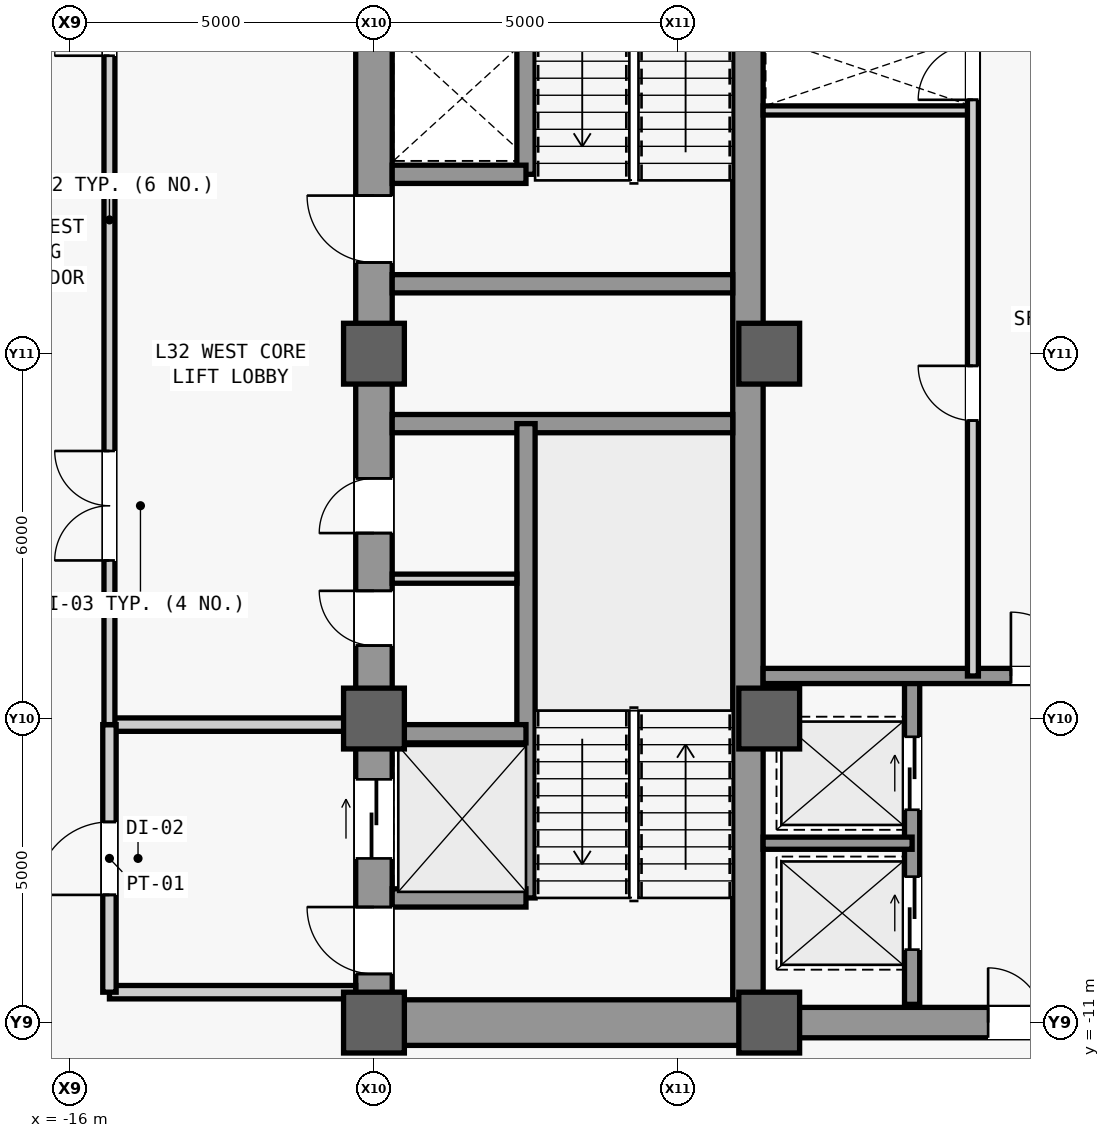
"""IFC4 building model, lengths in metres.
Left out: names, types, materials, properties, quantities, classifications, styles, units other than length and angle.
Written with IfcOpenShell. Run it as: python <this file> out.ifc"""

import sys

from ifc_helpers import new_model, si_unit, direction, frame, frame_2d, origin, origin_2d, place, context, subcontext, project, spatial, rectangle, extrude, source, transform, mapped, element, fill, save


model = new_model("IFC4")
c1 = context("Model", 3, precision=1e-05, world=origin(), true_north=direction((0.0, 1.0)))
c2 = subcontext(c1, "Body", "Model", "MODEL_VIEW")
j1 = project(units=[si_unit("LENGTHUNIT", "METRE"), si_unit("PLANEANGLEUNIT", "RADIAN")], contexts=[c1])
p1 = place(None, origin())
s1 = spatial("IfcSite", under=j1, at=p1, CompositionType="ELEMENT")
p2 = place(p1, origin())
s2 = spatial("IfcBuilding", under=s1, at=p2, CompositionType="ELEMENT")
p3 = place(p2, frame((0.0, 0.0, 140.6)))
s3 = spatial("IfcBuildingStorey", under=s2, at=p3, CompositionType="ELEMENT", Elevation=140.6)
m1 = source(origin(), c2, "Body", "SweptSolid", [
    extrude(rectangle(XDim=22.0, YDim=0.6, at=frame_2d((11.0, 0.0))), origin(), (0.0, 0.0, 1.0), 3.84),
])
p4 = place(p3, frame((-11.0, -11.0, 0.0), z_axis=(0.0, 0.0, 1.0), x_axis=(0.0, 1.0, 0.0)))
e1 = element("IfcWall", 1, at=p4, inside=s3, PredefinedType="SHEAR", context=c2, shape_type="MappedRepresentation", body=[
    mapped(m1, transform((0.0, 0.0, 0.0), scale=1.0)),
])
m2 = source(origin(), c2, "Body", "SweptSolid", [
    extrude(rectangle(XDim=1.1, YDim=2.2, at=frame_2d((0.55, 1.1))), frame((0.0, 0.31, 0.0), z_axis=(0.0, -1.0, 0.0), x_axis=(1.0, 0.0, 0.0)), (0.0, 0.0, 1.0), 0.62),
])
p5 = place(p4, frame((0.8, 0.0, 0.0)))
e2 = element("IfcOpeningElement", 2, at=p5, cuts=e1, PredefinedType="OPENING", context=c2, shape_type="MappedRepresentation", body=[
    mapped(m2, transform((0.0, 0.0, 0.0), scale=1.0)),
])
p6 = place(p4, frame((12.5, 0.0, 0.0)))
e3 = element("IfcOpeningElement", 3, at=p6, cuts=e1, PredefinedType="OPENING", context=c2, shape_type="MappedRepresentation", body=[
    mapped(m2, transform((0.0, 0.0, 0.0), scale=1.0)),
])
m3 = source(origin(), c2, "Body", "SweptSolid", [
    extrude(rectangle(XDim=0.9, YDim=2.15, at=frame_2d((0.45, 1.075))), frame((0.0, 0.31, 0.0), z_axis=(0.0, -1.0, 0.0), x_axis=(1.0, 0.0, 0.0)), (0.0, 0.0, 1.0), 0.62),
])
p7 = place(p4, frame((6.2, 0.0, 0.0)))
e4 = element("IfcOpeningElement", 4, at=p7, cuts=e1, PredefinedType="OPENING", context=c2, shape_type="MappedRepresentation", body=[
    mapped(m3, transform((0.0, 0.0, 0.0), scale=1.0)),
])
p8 = place(p4, frame((8.05, 0.0, 0.0)))
e5 = element("IfcOpeningElement", 5, at=p8, cuts=e1, PredefinedType="OPENING", context=c2, shape_type="MappedRepresentation", body=[
    mapped(m3, transform((0.0, 0.0, 0.0), scale=1.0)),
])
m4 = source(origin(), c2, "Body", "SweptSolid", [
    extrude(rectangle(XDim=1.3, YDim=2.3, at=frame_2d((0.65, 1.15))), frame((0.0, 0.31, 0.0), z_axis=(0.0, -1.0, 0.0), x_axis=(1.0, 0.0, 0.0)), (0.0, 0.0, 1.0), 0.62),
])
p9 = place(p4, frame((2.7, 0.0, 0.0)))
e6 = element("IfcOpeningElement", 6, at=p9, cuts=e1, PredefinedType="OPENING", context=c2, shape_type="MappedRepresentation", body=[
    mapped(m4, transform((0.0, 0.0, 0.0), scale=1.0)),
])
m5 = source(origin(), c2, "Body", "SweptSolid", [
    extrude(rectangle(XDim=21.4, YDim=0.5, at=frame_2d((10.7, 0.0))), origin(), (0.0, 0.0, 1.0), 3.84),
])
p10 = place(p3, frame((-4.85, -10.7, 0.0), z_axis=(0.0, 0.0, 1.0), x_axis=(0.0, 1.0, 0.0)))
e7 = element("IfcWall", 7, at=p10, inside=s3, PredefinedType="SHEAR", context=c2, shape_type="MappedRepresentation", body=[
    mapped(m5, transform((0.0, 0.0, 0.0), scale=1.0)),
])
m6 = source(origin(), c2, "Body", "SweptSolid", [
    extrude(rectangle(XDim=5.85, YDim=0.75, at=frame_2d((2.925, 0.0))), origin(), (0.0, 0.0, 1.0), 3.84),
])
p11 = place(p3, frame((-10.7, -11.0, 0.0), z_axis=(0.0, 0.0, 1.0), x_axis=(1.0, 0.0, 0.0)))
e8 = element("IfcWall", 8, at=p11, inside=s3, PredefinedType="SHEAR", context=c2, shape_type="MappedRepresentation", body=[
    mapped(m6, transform((0.0, 0.0, 0.0), scale=1.0)),
])
m7 = source(origin(), c2, "Body", "SweptSolid", [
    extrude(rectangle(XDim=5.6, YDim=0.3, at=frame_2d((2.8, 0.0))), origin(), (0.0, 0.0, 1.0), 3.84),
])
for number, where, z_axis, x_axis in (
    (9, (-10.7, -1.15, 0.0), (0.0, 0.0, 1.0), (1.0, 0.0, 0.0)),
    (10, (-10.7, 1.15, 0.0), (0.0, 0.0, 1.0), (1.0, 0.0, 0.0)),
):
    element("IfcWall", number, at=place(p3, frame(where, z_axis=z_axis, x_axis=x_axis)), inside=s3, PredefinedType="SHEAR", context=c2, shape_type="MappedRepresentation", body=[
        mapped(m7, transform((0.0, 0.0, 0.0), scale=1.0)),
    ])
m8 = source(origin(), c2, "Body", "SweptSolid", [
    extrude(rectangle(XDim=9.2, YDim=0.5, at=frame_2d((4.6, 0.0))), origin(), (0.0, 0.0, 1.0), 3.84),
])
p12 = place(p3, frame((-4.6, -11.0, 0.0), z_axis=(0.0, 0.0, 1.0), x_axis=(1.0, 0.0, 0.0)))
e11 = element("IfcWall", 11, at=p12, inside=s3, PredefinedType="SHEAR", context=c2, shape_type="MappedRepresentation", body=[
    mapped(m8, transform((0.0, 0.0, 0.0), scale=1.0)),
])
m9 = source(origin(), c2, "Body", "SweptSolid", [
    extrude(rectangle(XDim=1.8, YDim=2.25, at=frame_2d((0.9, 1.125))), frame((0.0, 0.26, 0.0), z_axis=(0.0, -1.0, 0.0), x_axis=(1.0, 0.0, 0.0)), (0.0, 0.0, 1.0), 0.52),
])
p13 = place(p12, frame((3.7, 0.0, 0.0)))
e12 = element("IfcOpeningElement", 12, at=p13, cuts=e11, PredefinedType="OPENING", context=c2, shape_type="MappedRepresentation", body=[
    mapped(m9, transform((0.0, 0.0, 0.0), scale=1.0)),
])
m10 = source(origin(), c2, "Body", "SweptSolid", [
    extrude(rectangle(XDim=1.0, YDim=1.0, at=origin_2d()), origin(), (0.0, 0.0, 1.0), 4.1),
])
for number, where, z_axis, x_axis in (
    (13, (-11.0, -11.0, 0.0), (0.0, 0.0, 1.0), (1.0, 0.0, 0.0)),
    (14, (-11.0, -6.0, 0.0), (0.0, 0.0, 1.0), (1.0, 0.0, 0.0)),
    (15, (-11.0, 0.0, 0.0), (0.0, 0.0, 1.0), (1.0, 0.0, 0.0)),
    (16, (-4.5, -11.0, 0.0), (0.0, 0.0, 1.0), (1.0, 0.0, 0.0)),
    (17, (-4.5, -6.0, 0.0), (0.0, 0.0, 1.0), (1.0, 0.0, 0.0)),
    (18, (-4.5, 0.0, 0.0), (0.0, 0.0, 1.0), (1.0, 0.0, 0.0)),
):
    element("IfcColumn", number, at=place(p3, frame(where, z_axis=z_axis, x_axis=x_axis)), inside=s3, PredefinedType="COLUMN", context=c2, shape_type="MappedRepresentation", body=[
        mapped(m10, transform((0.0, 0.0, 0.0), scale=1.0)),
    ])
m11 = source(origin(), c2, "Body", "SweptSolid", [
    extrude(rectangle(XDim=7.8, YDim=0.3, at=frame_2d((3.9, 0.0))), origin(), (0.0, 0.0, 1.0), 3.84),
])
p14 = place(p3, frame((-8.5, -8.95, 0.0), z_axis=(0.0, 0.0, 1.0), x_axis=(0.0, 1.0, 0.0)))
e19 = element("IfcWall", 19, at=p14, inside=s3, PredefinedType="SHEAR", context=c2, shape_type="MappedRepresentation", body=[
    mapped(m11, transform((0.0, 0.0, 0.0), scale=1.0)),
])
m12 = source(origin(), c2, "Body", "SweptSolid", [
    extrude(rectangle(XDim=2.2, YDim=0.3, at=frame_2d((1.1, 0.0))), origin(), (0.0, 0.0, 1.0), 3.84),
])
for number, where, z_axis, x_axis in (
    (20, (-10.7, -8.95, 0.0), (0.0, 0.0, 1.0), (1.0, 0.0, 0.0)),
    (21, (-10.7, -6.25, 0.0), (0.0, 0.0, 1.0), (1.0, 0.0, 0.0)),
):
    element("IfcWall", number, at=place(p3, frame(where, z_axis=z_axis, x_axis=x_axis)), inside=s3, PredefinedType="SHEAR", context=c2, shape_type="MappedRepresentation", body=[
        mapped(m12, transform((0.0, 0.0, 0.0), scale=1.0)),
    ])
m13 = source(origin(), c2, "Body", "SweptSolid", [
    extrude(rectangle(XDim=7.75, YDim=0.3, at=frame_2d((3.875, 0.0))), origin(), (0.0, 0.0, 1.0), 3.84),
])
p15 = place(p3, frame((-8.5, 2.95, 0.0), z_axis=(0.0, 0.0, 1.0), x_axis=(0.0, 1.0, 0.0)))
e22 = element("IfcWall", 22, at=p15, inside=s3, PredefinedType="SHEAR", context=c2, shape_type="MappedRepresentation", body=[
    mapped(m13, transform((0.0, 0.0, 0.0), scale=1.0)),
])
p16 = place(p3, frame((-10.7, 2.95, 0.0), z_axis=(0.0, 0.0, 1.0), x_axis=(1.0, 0.0, 0.0)))
e23 = element("IfcWall", 23, at=p16, inside=s3, PredefinedType="SHEAR", context=c2, shape_type="MappedRepresentation", body=[
    mapped(m12, transform((0.0, 0.0, 0.0), scale=1.0)),
])
m14 = source(origin(), c2, "Body", "SweptSolid", [
    extrude(rectangle(XDim=2.05, YDim=0.15, at=frame_2d((1.025, 0.0))), origin(), (0.0, 0.0, 1.0), 3.84),
])
p17 = place(p3, frame((-10.7, -3.7, 0.0), z_axis=(0.0, 0.0, 1.0), x_axis=(1.0, 0.0, 0.0)))
e24 = element("IfcWall", 24, at=p17, inside=s3, PredefinedType="PARTITIONING", context=c2, shape_type="MappedRepresentation", body=[
    mapped(m14, transform((0.0, 0.0, 0.0), scale=1.0)),
])
m15 = source(origin(), c2, "Body", "SweptSolid", [
    extrude(rectangle(XDim=4.05, YDim=0.22, at=frame_2d((2.025, 0.0))), origin(), (0.0, 0.0, 1.0), 3.84),
])
p18 = place(p3, frame((-15.35, -10.5, 0.0), z_axis=(0.0, 0.0, 1.0), x_axis=(1.0, 0.0, 0.0)))
e25 = element("IfcWall", 25, at=p18, inside=s3, PredefinedType="PARTITIONING", context=c2, shape_type="MappedRepresentation", body=[
    mapped(m15, transform((0.0, 0.0, 0.0), scale=1.0)),
])
m16 = source(origin(), c2, "Body", "SweptSolid", [
    extrude(rectangle(XDim=4.05, YDim=0.22, at=frame_2d((2.025, 0.0))), origin(), (0.0, 0.0, 1.0), 3.067),
])
p19 = place(p3, frame((-15.35, -6.1, 0.0), z_axis=(0.0, 0.0, 1.0), x_axis=(1.0, 0.0, 0.0)))
e26 = element("IfcWall", 26, at=p19, inside=s3, PredefinedType="PARTITIONING", context=c2, shape_type="MappedRepresentation", body=[
    mapped(m16, transform((0.0, 0.0, 0.0), scale=1.0)),
])
m17 = source(origin(), c2, "Body", "SweptSolid", [
    extrude(rectangle(XDim=4.4, YDim=0.22, at=frame_2d((2.2, 0.0))), origin(), (0.0, 0.0, 1.0), 3.84),
])
p20 = place(p3, frame((-15.35, -10.5, 0.0), z_axis=(0.0, 0.0, 1.0), x_axis=(0.0, 1.0, 0.0)))
e27 = element("IfcWall", 27, at=p20, inside=s3, PredefinedType="PARTITIONING", context=c2, shape_type="MappedRepresentation", body=[
    mapped(m17, transform((0.0, 0.0, 0.0), scale=1.0)),
])
m18 = source(origin(), c2, "Body", "SweptSolid", [
    extrude(rectangle(XDim=1.2, YDim=2.2, at=frame_2d((0.6, 1.1))), frame((0.0, 0.12, 0.0), z_axis=(0.0, -1.0, 0.0), x_axis=(1.0, 0.0, 0.0)), (0.0, 0.0, 1.0), 0.24),
])
p21 = place(p20, frame((1.6, 0.0, 0.0)))
e28 = element("IfcOpeningElement", 28, at=p21, cuts=e27, PredefinedType="OPENING", context=c2, shape_type="MappedRepresentation", body=[
    mapped(m18, transform((0.0, 0.0, 0.0), scale=1.0)),
])
m19 = source(origin(), c2, "Body", "SweptSolid", [
    extrude(rectangle(XDim=16.6, YDim=0.18, at=frame_2d((8.3, 0.0))), origin(), (0.0, 0.0, 1.0), 3.84),
])
p22 = place(p3, frame((-15.35, -6.1, 0.0), z_axis=(0.0, 0.0, 1.0), x_axis=(0.0, 1.0, 0.0)))
e29 = element("IfcWall", 29, at=p22, inside=s3, PredefinedType="PARTITIONING", context=c2, shape_type="MappedRepresentation", body=[
    mapped(m19, transform((0.0, 0.0, 0.0), scale=1.0)),
])
m20 = source(origin(), c2, "Body", "SweptSolid", [
    extrude(rectangle(XDim=1.8, YDim=2.25, at=frame_2d((0.9, 1.125))), frame((0.0, 0.1, 0.0), z_axis=(0.0, -1.0, 0.0), x_axis=(1.0, 0.0, 0.0)), (0.0, 0.0, 1.0), 0.2),
])
p23 = place(p22, frame((2.7, 0.0, 0.0)))
e30 = element("IfcOpeningElement", 30, at=p23, cuts=e29, PredefinedType="OPENING", context=c2, shape_type="MappedRepresentation", body=[
    mapped(m20, transform((0.0, 0.0, 0.0), scale=1.0)),
])
p24 = place(p22, frame((11.0, 0.0, 0.0)))
e31 = element("IfcOpeningElement", 31, at=p24, cuts=e29, PredefinedType="OPENING", context=c2, shape_type="MappedRepresentation", body=[
    mapped(m20, transform((0.0, 0.0, 0.0), scale=1.0)),
])
m21 = source(origin(), c2, "Body", "SweptSolid", [
    extrude(rectangle(XDim=3.45, YDim=0.15, at=frame_2d((1.725, 0.0))), origin(), (0.0, 0.0, 1.0), 3.84),
])
p25 = place(p3, frame((-4.6, 4.0, 0.0), z_axis=(0.0, 0.0, 1.0), x_axis=(1.0, 0.0, 0.0)))
e32 = element("IfcWall", 32, at=p25, inside=s3, PredefinedType="PARTITIONING", context=c2, shape_type="MappedRepresentation", body=[
    mapped(m21, transform((0.0, 0.0, 0.0), scale=1.0)),
])
m22 = source(origin(), c2, "Body", "SweptSolid", [
    extrude(rectangle(XDim=5.4, YDim=0.25, at=frame_2d((2.7, 0.0))), origin(), (0.0, 0.0, 1.0), 3.84),
])
p26 = place(p3, frame((-2.15, -10.7, 0.0), z_axis=(0.0, 0.0, 1.0), x_axis=(0.0, 1.0, 0.0)))
e33 = element("IfcWall", 33, at=p26, inside=s3, PredefinedType="SHEAR", context=c2, shape_type="MappedRepresentation", body=[
    mapped(m22, transform((0.0, 0.0, 0.0), scale=1.0)),
])
m23 = source(origin(), c2, "Body", "SweptSolid", [
    extrude(rectangle(XDim=1.2, YDim=2.3, at=frame_2d((0.6, 1.15))), frame((0.0, 0.135, 0.0), z_axis=(0.0, -1.0, 0.0), x_axis=(1.0, 0.0, 0.0)), (0.0, 0.0, 1.0), 0.27),
])
p27 = place(p26, frame((0.9, 0.0, 0.0)))
e34 = element("IfcOpeningElement", 34, at=p27, cuts=e33, PredefinedType="OPENING", context=c2, shape_type="MappedRepresentation", body=[
    mapped(m23, transform((0.0, 0.0, 0.0), scale=1.0)),
])
p28 = place(p26, frame((3.2, 0.0, 0.0)))
e35 = element("IfcOpeningElement", 35, at=p28, cuts=e33, PredefinedType="OPENING", context=c2, shape_type="MappedRepresentation", body=[
    mapped(m23, transform((0.0, 0.0, 0.0), scale=1.0)),
])
m24 = source(origin(), c2, "Body", "SweptSolid", [
    extrude(rectangle(XDim=2.45, YDim=0.2, at=frame_2d((1.225, 0.0))), origin(), (0.0, 0.0, 1.0), 3.84),
])
p29 = place(p3, frame((-4.6, -8.05, 0.0), z_axis=(0.0, 0.0, 1.0), x_axis=(1.0, 0.0, 0.0)))
e36 = element("IfcWall", 36, at=p29, inside=s3, PredefinedType="SHEAR", context=c2, shape_type="MappedRepresentation", body=[
    mapped(m24, transform((0.0, 0.0, 0.0), scale=1.0)),
])
m25 = source(origin(), c2, "Body", "SweptSolid", [
    extrude(rectangle(XDim=9.2, YDim=0.25, at=frame_2d((4.6, 0.0))), origin(), (0.0, 0.0, 1.0), 3.84),
])
p30 = place(p3, frame((-4.6, -5.3, 0.0), z_axis=(0.0, 0.0, 1.0), x_axis=(1.0, 0.0, 0.0)))
e37 = element("IfcWall", 37, at=p30, inside=s3, PredefinedType="SHEAR", context=c2, shape_type="MappedRepresentation", body=[
    mapped(m25, transform((0.0, 0.0, 0.0), scale=1.0)),
])
m26 = source(origin(), c2, "Body", "SweptSolid", [
    extrude(rectangle(XDim=1.05, YDim=2.2, at=frame_2d((0.525, 1.1))), frame((0.0, 0.135, 0.0), z_axis=(0.0, -1.0, 0.0), x_axis=(1.0, 0.0, 0.0)), (0.0, 0.0, 1.0), 0.27),
])
p31 = place(p30, frame((4.075, 0.0, 0.0)))
e38 = element("IfcOpeningElement", 38, at=p31, cuts=e37, PredefinedType="OPENING", context=c2, shape_type="MappedRepresentation", body=[
    mapped(m26, transform((0.0, 0.0, 0.0), scale=1.0)),
])
m27 = source(origin(), c2, "Body", "SweptSolid", [
    extrude(rectangle(XDim=10.6, YDim=0.18, at=frame_2d((5.3, 0.0))), origin(), (0.0, 0.0, 1.0), 3.84),
])
p32 = place(p3, frame((-1.15, -5.3, 0.0), z_axis=(0.0, 0.0, 1.0), x_axis=(0.0, 1.0, 0.0)))
e39 = element("IfcWall", 39, at=p32, inside=s3, PredefinedType="PARTITIONING", context=c2, shape_type="MappedRepresentation", body=[
    mapped(m27, transform((0.0, 0.0, 0.0), scale=1.0)),
])
m28 = source(origin(), c2, "Body", "SweptSolid", [
    extrude(rectangle(XDim=0.9, YDim=2.15, at=frame_2d((0.45, 1.075))), frame((0.0, 0.1, 0.0), z_axis=(0.0, -1.0, 0.0), x_axis=(1.0, 0.0, 0.0)), (0.0, 0.0, 1.0), 0.2),
])
p33 = place(p32, frame((4.2, 0.0, 0.0)))
e40 = element("IfcOpeningElement", 40, at=p33, cuts=e39, PredefinedType="OPENING", context=c2, shape_type="MappedRepresentation", body=[
    mapped(m28, transform((0.0, 0.0, 0.0), scale=1.0)),
])
p34 = place(p32, frame((9.475, 0.0, 0.0)))
e41 = element("IfcOpeningElement", 41, at=p34, cuts=e39, PredefinedType="OPENING", context=c2, shape_type="MappedRepresentation", body=[
    mapped(m28, transform((0.0, 0.0, 0.0), scale=1.0)),
])
m29 = source(origin(), c2, "Body", "SweptSolid", [
    extrude(rectangle(XDim=1.1, YDim=2.2, at=frame_2d((0.55, 1.1))), frame((0.0, 0.025, 0.0), z_axis=(0.0, -1.0, 0.0), x_axis=(1.0, 0.0, 0.0)), (0.0, 0.0, 1.0), 0.05),
])
p35 = place(p5, origin())
e42 = element("IfcDoor", 42, at=p35, inside=s3, OperationType="SINGLE_SWING_RIGHT", PredefinedType="DOOR", context=c2, shape_type="MappedRepresentation", body=[
    mapped(m29, transform((0.0, 0.0, 0.0), scale=1.0)),
])
fill(e2, e42)
p36 = place(p6, origin())
e43 = element("IfcDoor", 43, at=p36, inside=s3, OperationType="SINGLE_SWING_RIGHT", PredefinedType="DOOR", context=c2, shape_type="MappedRepresentation", body=[
    mapped(m29, transform((0.0, 0.0, 0.0), scale=1.0)),
])
fill(e3, e43)
m30 = source(origin(), c2, "Body", "SweptSolid", [
    extrude(rectangle(XDim=0.9, YDim=2.15, at=frame_2d((0.45, 1.075))), frame((0.0, 0.025, 0.0), z_axis=(0.0, -1.0, 0.0), x_axis=(1.0, 0.0, 0.0)), (0.0, 0.0, 1.0), 0.05),
])
p37 = place(p7, origin())
e44 = element("IfcDoor", 44, at=p37, inside=s3, OperationType="SINGLE_SWING_RIGHT", PredefinedType="DOOR", context=c2, shape_type="MappedRepresentation", body=[
    mapped(m30, transform((0.0, 0.0, 0.0), scale=1.0)),
])
fill(e4, e44)
p38 = place(p8, origin())
e45 = element("IfcDoor", 45, at=p38, inside=s3, OperationType="SINGLE_SWING_LEFT", PredefinedType="DOOR", context=c2, shape_type="MappedRepresentation", body=[
    mapped(m30, transform((0.0, 0.0, 0.0), scale=1.0)),
])
fill(e5, e45)
m31 = source(origin(), c2, "Body", "SweptSolid", [
    extrude(rectangle(XDim=1.2, YDim=2.2, at=frame_2d((0.6, 1.1))), frame((0.0, 0.025, 0.0), z_axis=(0.0, -1.0, 0.0), x_axis=(1.0, 0.0, 0.0)), (0.0, 0.0, 1.0), 0.05),
])
p39 = place(p21, origin())
e46 = element("IfcDoor", 46, at=p39, inside=s3, OperationType="SINGLE_SWING_LEFT", PredefinedType="DOOR", context=c2, shape_type="MappedRepresentation", body=[
    mapped(m31, transform((0.0, 0.0, 0.0), scale=1.0)),
])
fill(e28, e46)
m32 = source(origin(), c2, "Body", "SweptSolid", [
    extrude(rectangle(XDim=1.8, YDim=2.25, at=frame_2d((0.9, 1.125))), frame((0.0, 0.025, 0.0), z_axis=(0.0, -1.0, 0.0), x_axis=(1.0, 0.0, 0.0)), (0.0, 0.0, 1.0), 0.05),
])
p40 = place(p23, origin())
e47 = element("IfcDoor", 47, at=p40, inside=s3, OperationType="SINGLE_SWING_LEFT", PredefinedType="DOOR", context=c2, shape_type="MappedRepresentation", body=[
    mapped(m32, transform((0.0, 0.0, 0.0), scale=1.0)),
])
fill(e30, e47)
p41 = place(p24, origin())
e48 = element("IfcDoor", 48, at=p41, inside=s3, OperationType="SINGLE_SWING_RIGHT", PredefinedType="DOOR", context=c2, shape_type="MappedRepresentation", body=[
    mapped(m32, transform((0.0, 0.0, 0.0), scale=1.0)),
])
fill(e31, e48)
m33 = source(origin(), c2, "Body", "SweptSolid", [
    extrude(rectangle(XDim=1.05, YDim=2.2, at=frame_2d((0.525, 1.1))), frame((0.0, 0.025, 0.0), z_axis=(0.0, -1.0, 0.0), x_axis=(1.0, 0.0, 0.0)), (0.0, 0.0, 1.0), 0.05),
])
p42 = place(p31, origin())
e49 = element("IfcDoor", 49, at=p42, inside=s3, OperationType="SINGLE_SWING_LEFT", PredefinedType="DOOR", context=c2, shape_type="MappedRepresentation", body=[
    mapped(m33, transform((0.0, 0.0, 0.0), scale=1.0)),
])
fill(e38, e49)
p43 = place(p13, origin())
e50 = element("IfcDoor", 50, at=p43, inside=s3, OperationType="SINGLE_SWING_LEFT", PredefinedType="DOOR", context=c2, shape_type="MappedRepresentation", body=[
    mapped(m32, transform((0.0, 0.0, 0.0), scale=1.0)),
])
fill(e12, e50)
p44 = place(p33, origin())
e51 = element("IfcDoor", 51, at=p44, inside=s3, OperationType="SINGLE_SWING_RIGHT", PredefinedType="DOOR", context=c2, shape_type="MappedRepresentation", body=[
    mapped(m30, transform((0.0, 0.0, 0.0), scale=1.0)),
])
fill(e40, e51)
p45 = place(p34, origin())
e52 = element("IfcDoor", 52, at=p45, inside=s3, OperationType="SINGLE_SWING_LEFT", PredefinedType="DOOR", context=c2, shape_type="MappedRepresentation", body=[
    mapped(m30, transform((0.0, 0.0, 0.0), scale=1.0)),
])
fill(e41, e52)
m34 = source(origin(), c2, "Body", "SweptSolid", [
    extrude(rectangle(XDim=1.2, YDim=2.3, at=frame_2d((0.6, 1.15))), frame((0.0, 0.025, 0.0), z_axis=(0.0, -1.0, 0.0), x_axis=(1.0, 0.0, 0.0)), (0.0, 0.0, 1.0), 0.05),
])
p46 = place(p27, origin())
e53 = element("IfcDoor", 53, at=p46, inside=s3, OperationType="SLIDING_TO_LEFT", PredefinedType="DOOR", context=c2, shape_type="MappedRepresentation", body=[
    mapped(m34, transform((0.0, 0.0, 0.0), scale=1.0)),
])
fill(e34, e53)
p47 = place(p28, origin())
e54 = element("IfcDoor", 54, at=p47, inside=s3, OperationType="SLIDING_TO_LEFT", PredefinedType="DOOR", context=c2, shape_type="MappedRepresentation", body=[
    mapped(m34, transform((0.0, 0.0, 0.0), scale=1.0)),
])
fill(e35, e54)
m35 = source(origin(), c2, "Body", "SweptSolid", [
    extrude(rectangle(XDim=1.3, YDim=2.3, at=frame_2d((0.65, 1.15))), frame((0.0, 0.025, 0.0), z_axis=(0.0, -1.0, 0.0), x_axis=(1.0, 0.0, 0.0)), (0.0, 0.0, 1.0), 0.05),
])
p48 = place(p9, origin())
e55 = element("IfcDoor", 55, at=p48, inside=s3, OperationType="SLIDING_TO_LEFT", PredefinedType="DOOR", context=c2, shape_type="MappedRepresentation", body=[
    mapped(m35, transform((0.0, 0.0, 0.0), scale=1.0)),
])
fill(e6, e55)
save(model, sys.argv[1])
